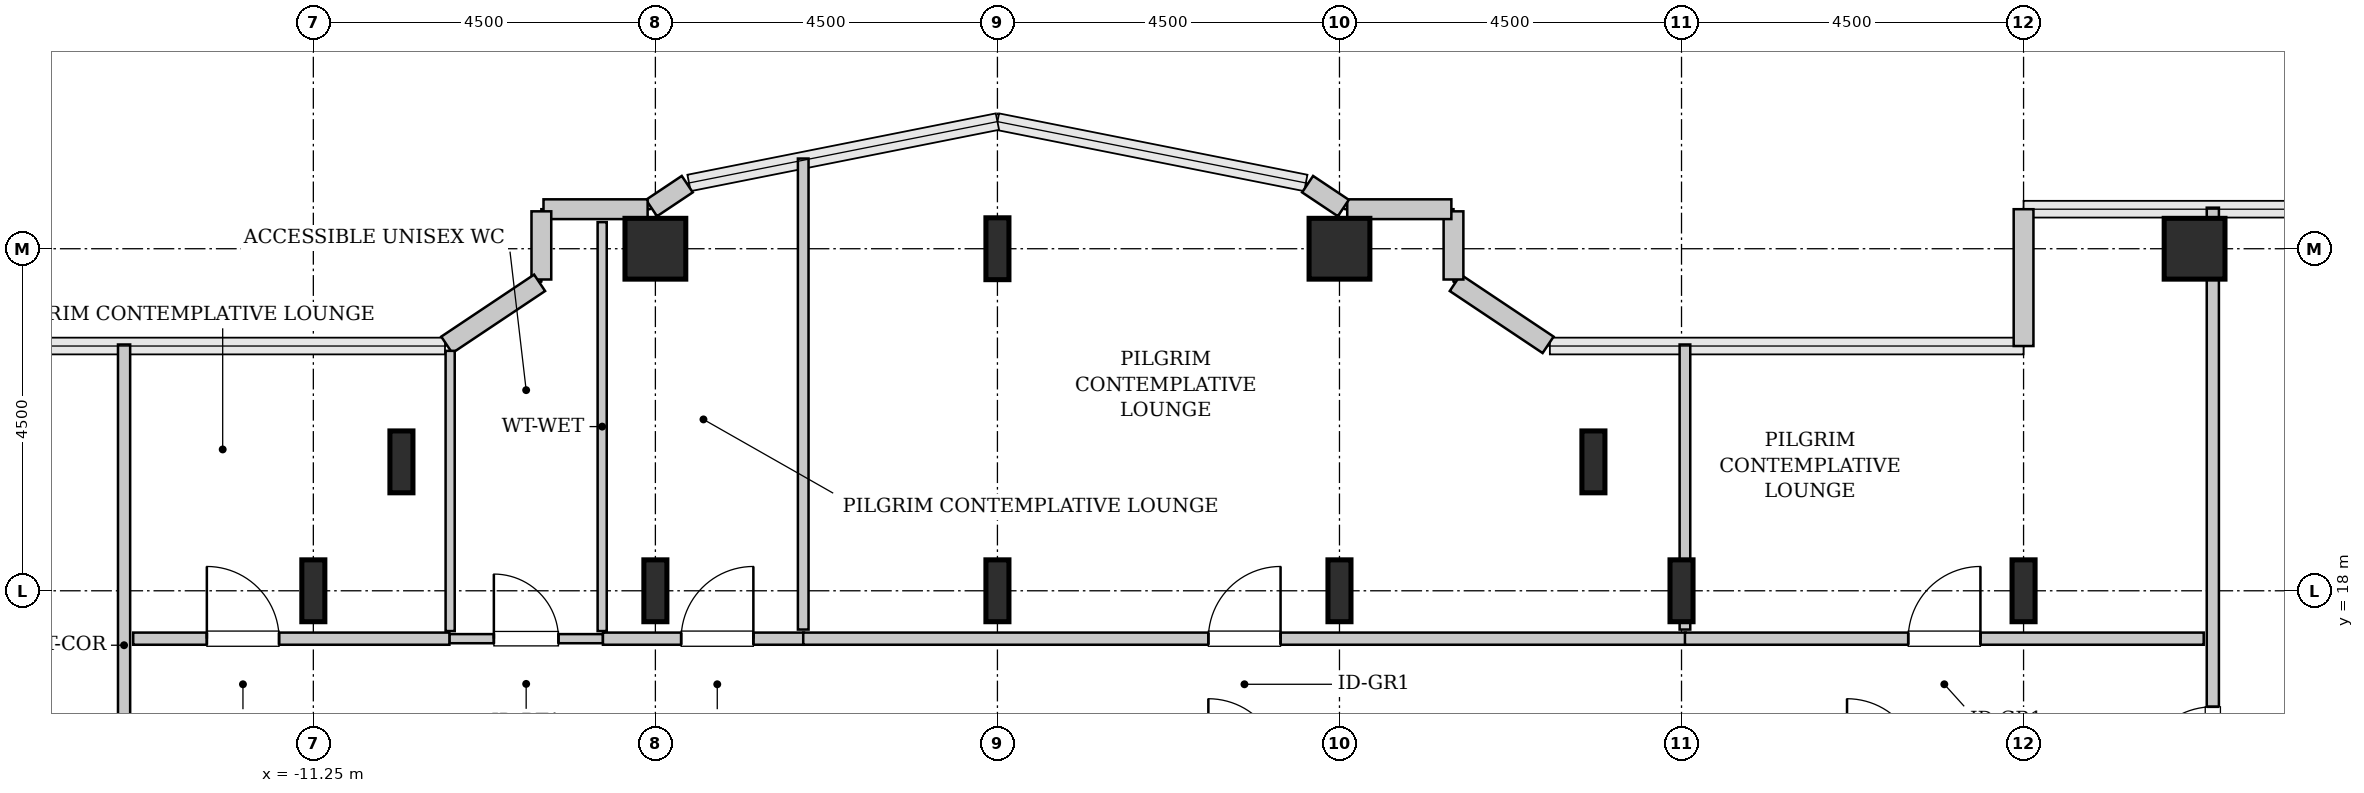
"""IFC4 building model, lengths in metres.
Left out: names, types, materials, properties, quantities, classifications, styles, units other than length and angle.
Written with IfcOpenShell. Run it as: python <this file> out.ifc"""

import sys

from ifc_helpers import new_model, si_unit, direction, frame, frame_2d, origin, origin_2d, place, context, subcontext, project, spatial, rectangle, hollow_rectangle, i_section, extrude, source, transform, mapped, element, fill, save


model = new_model("IFC4")
c1 = context("Model", 3, precision=1e-05, world=origin(), true_north=direction((0.0, 1.0)))
c2 = subcontext(c1, "Body", "Model", "MODEL_VIEW")
j1 = project(units=[si_unit("LENGTHUNIT", "METRE"), si_unit("PLANEANGLEUNIT", "RADIAN")], contexts=[c1])
p1 = place(None, origin())
s1 = spatial("IfcSite", under=j1, at=p1, CompositionType="ELEMENT")
p2 = place(p1, origin())
s2 = spatial("IfcBuilding", under=s1, at=p2, CompositionType="ELEMENT")
p3 = place(p2, frame((0.0, 0.0, 167.8)))
s3 = spatial("IfcBuildingStorey", under=s2, at=p3, CompositionType="ELEMENT", Elevation=167.8)
m1 = source(origin(), c2, "Body", "SweptSolid", [
    extrude(i_section(OverallWidth=0.303, OverallDepth=0.814, WebThickness=0.021, FlangeThickness=0.04, FilletRadius=0.03, at=origin_2d()), origin(), (0.0, 0.0, 1.0), 3.8),
])
for number, where, z_axis, x_axis in (
    (1, (-11.25, 18.0, 0.0), (0.0, 0.0, 1.0), (1.0, 0.0, 0.0)),
    (2, (-10.091, 19.696, 0.0), (0.0, 0.0, 1.0), (1.0, 0.0, 0.0)),
    (3, (-6.75, 18.0, 0.0), (0.0, 0.0, 1.0), (1.0, 0.0, 0.0)),
):
    element("IfcColumn", number, at=place(p3, frame(where, z_axis=z_axis, x_axis=x_axis)), inside=s3, PredefinedType="COLUMN", context=c2, shape_type="MappedRepresentation", body=[
        mapped(m1, transform((0.0, 0.0, 0.0), x_axis=(1.0, 0.0, 0.0), y_axis=(0.0, 1.0, 0.0), z_axis=(0.0, 0.0, 1.0), scale=1.0)),
    ])
m2 = source(origin(), c2, "Body", "SweptSolid", [
    extrude(hollow_rectangle(XDim=0.8, YDim=0.8, WallThickness=0.04, InnerFilletRadius=0.04, OuterFilletRadius=0.08, at=origin_2d()), origin(), (0.0, 0.0, 1.0), 3.8),
])
p4 = place(p3, frame((-6.75, 22.5, 0.0), z_axis=(0.0, 0.0, 1.0), x_axis=(1.0, 0.0, 0.0)))
e4 = element("IfcColumn", 4, at=p4, inside=s3, PredefinedType="COLUMN", context=c2, shape_type="MappedRepresentation", body=[
    mapped(m2, transform((0.0, 0.0, 0.0), x_axis=(1.0, 0.0, 0.0), y_axis=(0.0, 1.0, 0.0), z_axis=(0.0, 0.0, 1.0), scale=1.0)),
])
for number, where, z_axis, x_axis in (
    (5, (-2.25, 18.0, 0.0), (0.0, 0.0, 1.0), (1.0, 0.0, 0.0)),
    (6, (-2.25, 22.5, 0.0), (0.0, 0.0, 1.0), (1.0, 0.0, 0.0)),
    (7, (2.25, 18.0, 0.0), (0.0, 0.0, 1.0), (1.0, 0.0, 0.0)),
):
    element("IfcColumn", number, at=place(p3, frame(where, z_axis=z_axis, x_axis=x_axis)), inside=s3, PredefinedType="COLUMN", context=c2, shape_type="MappedRepresentation", body=[
        mapped(m1, transform((0.0, 0.0, 0.0), x_axis=(1.0, 0.0, 0.0), y_axis=(0.0, 1.0, 0.0), z_axis=(0.0, 0.0, 1.0), scale=1.0)),
    ])
p5 = place(p3, frame((2.25, 22.5, 0.0), z_axis=(0.0, 0.0, 1.0), x_axis=(1.0, 0.0, 0.0)))
e8 = element("IfcColumn", 8, at=p5, inside=s3, PredefinedType="COLUMN", context=c2, shape_type="MappedRepresentation", body=[
    mapped(m2, transform((0.0, 0.0, 0.0), x_axis=(1.0, 0.0, 0.0), y_axis=(0.0, 1.0, 0.0), z_axis=(0.0, 0.0, 1.0), scale=1.0)),
])
for number, where, z_axis, x_axis in (
    (9, (5.591, 19.696, 0.0), (0.0, 0.0, 1.0), (1.0, 0.0, 0.0)),
    (10, (6.75, 18.0, 0.0), (0.0, 0.0, 1.0), (1.0, 0.0, 0.0)),
    (11, (11.25, 18.0, 0.0), (0.0, 0.0, 1.0), (1.0, 0.0, 0.0)),
):
    element("IfcColumn", number, at=place(p3, frame(where, z_axis=z_axis, x_axis=x_axis)), inside=s3, PredefinedType="COLUMN", context=c2, shape_type="MappedRepresentation", body=[
        mapped(m1, transform((0.0, 0.0, 0.0), x_axis=(1.0, 0.0, 0.0), y_axis=(0.0, 1.0, 0.0), z_axis=(0.0, 0.0, 1.0), scale=1.0)),
    ])
p6 = place(p3, frame((13.5, 22.5, 0.0), z_axis=(0.0, 0.0, 1.0), x_axis=(1.0, 0.0, 0.0)))
e12 = element("IfcColumn", 12, at=p6, inside=s3, PredefinedType="COLUMN", context=c2, shape_type="MappedRepresentation", body=[
    mapped(m2, transform((0.0, 0.0, 0.0), x_axis=(1.0, 0.0, 0.0), y_axis=(0.0, 1.0, 0.0), z_axis=(0.0, 0.0, 1.0), scale=1.0)),
])
m3 = source(origin(), c2, "Body", "SweptSolid", [
    extrude(rectangle(XDim=1.8, YDim=0.26, at=frame_2d((0.9, 0.0))), origin(), (0.0, 0.0, 1.0), 3.55),
])
p7 = place(p3, frame((11.25, 23.02, 0.0), z_axis=(0.0, 0.0, 1.0), x_axis=(0.0, -1.0, 0.0)))
e13 = element("IfcWall", 13, at=p7, inside=s3, PredefinedType="SOLIDWALL", context=c2, shape_type="MappedRepresentation", body=[
    mapped(m3, transform((0.0, 0.0, 0.0), x_axis=(1.0, 0.0, 0.0), y_axis=(0.0, 1.0, 0.0), z_axis=(0.0, 0.0, 1.0), scale=1.0)),
])
m4 = source(origin(), c2, "Body", "SweptSolid", [
    extrude(rectangle(XDim=1.469, YDim=0.26, at=frame_2d((0.734, 0.0))), origin(), (0.0, 0.0, 1.0), 3.55),
])
p8 = place(p3, frame((4.995, 21.236, 0.0), z_axis=(0.0, 0.0, 1.0), x_axis=(-0.831461760506, 0.555581983884, 0.0)))
e14 = element("IfcWall", 14, at=p8, inside=s3, PredefinedType="SOLIDWALL", context=c2, shape_type="MappedRepresentation", body=[
    mapped(m4, transform((0.0, 0.0, 0.0), x_axis=(1.0, 0.0, 0.0), y_axis=(0.0, 1.0, 0.0), z_axis=(0.0, 0.0, 1.0), scale=1.0)),
])
m5 = source(origin(), c2, "Body", "SweptSolid", [
    extrude(rectangle(XDim=0.897, YDim=0.26, at=frame_2d((0.448, 0.0))), origin(), (0.0, 0.0, 1.0), 3.55),
])
p9 = place(p3, frame((3.75, 22.095, 0.0), z_axis=(0.0, 0.0, 1.0), x_axis=(0.0, 1.0, 0.0)))
e15 = element("IfcWall", 15, at=p9, inside=s3, PredefinedType="SOLIDWALL", context=c2, shape_type="MappedRepresentation", body=[
    mapped(m5, transform((0.0, 0.0, 0.0), x_axis=(1.0, 0.0, 0.0), y_axis=(0.0, 1.0, 0.0), z_axis=(0.0, 0.0, 1.0), scale=1.0)),
])
m6 = source(origin(), c2, "Body", "SweptSolid", [
    extrude(rectangle(XDim=1.37, YDim=0.26, at=frame_2d((0.685, 0.0))), origin(), (0.0, 0.0, 1.0), 3.55),
])
p10 = place(p3, frame((3.722, 23.02, 0.0), z_axis=(0.0, 0.0, 1.0), x_axis=(-1.0, 0.0, 0.0)))
e16 = element("IfcWall", 16, at=p10, inside=s3, PredefinedType="SOLIDWALL", context=c2, shape_type="MappedRepresentation", body=[
    mapped(m6, transform((0.0, 0.0, 0.0), x_axis=(1.0, 0.0, 0.0), y_axis=(0.0, 1.0, 0.0), z_axis=(0.0, 0.0, 1.0), scale=1.0)),
])
m7 = source(origin(), c2, "Body", "SweptSolid", [
    extrude(rectangle(XDim=0.565, YDim=0.26, at=frame_2d((0.283, 0.0))), origin(), (0.0, 0.0, 1.0), 3.55),
])
for number, where, z_axis, x_axis in (
    (17, (2.301, 23.036, 0.0), (0.0, 0.0, 1.0), (-0.832, 0.555, 0.0)),
    (18, (-6.331, 23.35, 0.0), (0.0, 0.0, 1.0), (-0.832, -0.555, 0.0)),
):
    element("IfcWall", number, at=place(p3, frame(where, z_axis=z_axis, x_axis=x_axis)), inside=s3, PredefinedType="SOLIDWALL", context=c2, shape_type="MappedRepresentation", body=[
        mapped(m7, transform((0.0, 0.0, 0.0), x_axis=(1.0, 0.0, 0.0), y_axis=(0.0, 1.0, 0.0), z_axis=(0.0, 0.0, 1.0), scale=1.0)),
    ])
p11 = place(p3, frame((-6.852, 23.02, 0.0), z_axis=(0.0, 0.0, 1.0), x_axis=(-1.0, 0.0, 0.0)))
e19 = element("IfcWall", 19, at=p11, inside=s3, PredefinedType="SOLIDWALL", context=c2, shape_type="MappedRepresentation", body=[
    mapped(m6, transform((0.0, 0.0, 0.0), x_axis=(1.0, 0.0, 0.0), y_axis=(0.0, 1.0, 0.0), z_axis=(0.0, 0.0, 1.0), scale=1.0)),
])
p12 = place(p3, frame((-8.25, 22.992, 0.0), z_axis=(0.0, 0.0, 1.0), x_axis=(0.0, -1.0, 0.0)))
e20 = element("IfcWall", 20, at=p12, inside=s3, PredefinedType="SOLIDWALL", context=c2, shape_type="MappedRepresentation", body=[
    mapped(m5, transform((0.0, 0.0, 0.0), x_axis=(1.0, 0.0, 0.0), y_axis=(0.0, 1.0, 0.0), z_axis=(0.0, 0.0, 1.0), scale=1.0)),
])
p13 = place(p3, frame((-8.273, 22.052, 0.0), z_axis=(0.0, 0.0, 1.0), x_axis=(-0.831461760506, -0.555581983884, 0.0)))
e21 = element("IfcWall", 21, at=p13, inside=s3, PredefinedType="SOLIDWALL", context=c2, shape_type="MappedRepresentation", body=[
    mapped(m4, transform((0.0, 0.0, 0.0), x_axis=(1.0, 0.0, 0.0), y_axis=(0.0, 1.0, 0.0), z_axis=(0.0, 0.0, 1.0), scale=1.0)),
])
m8 = source(origin(), c2, "Body", "SweptSolid", [
    extrude(rectangle(XDim=2.02, YDim=0.12, at=frame_2d((1.01, 0.0))), origin(), (0.0, 0.0, 1.0), 3.535),
])
p14 = place(p3, frame((-9.46, 17.37, 0.0), z_axis=(0.0, 0.0, 1.0), x_axis=(1.0, 0.0, 0.0)))
e22 = element("IfcWall", 22, at=p14, inside=s3, PredefinedType="PLUMBINGWALL", context=c2, shape_type="MappedRepresentation", body=[
    mapped(m8, transform((0.0, 0.0, 0.0), x_axis=(1.0, 0.0, 0.0), y_axis=(0.0, 1.0, 0.0), z_axis=(0.0, 0.0, 1.0), scale=1.0)),
])
p15 = place(p14, frame((0.585, 0.0, 0.0)))
e23 = element("IfcOpeningElement", 23, at=p15, cuts=e22, PredefinedType="OPENING", context=c2, shape_type="SweptSolid", body=[
    extrude(rectangle(XDim=0.85, YDim=2.1, at=frame_2d((0.425, 1.05))), frame((0.0, 0.07, 0.0), z_axis=(0.0, -1.0, 0.0), x_axis=(1.0, 0.0, 0.0)), (0.0, 0.0, 1.0), 0.14),
])
m9 = source(origin(), c2, "Body", "SweptSolid", [
    extrude(rectangle(XDim=5.38, YDim=0.12, at=frame_2d((2.69, 0.0))), origin(), (0.0, 0.0, 1.0), 3.535),
])
p16 = place(p3, frame((-7.45, 17.47, 0.0), z_axis=(0.0, 0.0, 1.0), x_axis=(0.0, 1.0, 0.0)))
e24 = element("IfcWall", 24, at=p16, inside=s3, PredefinedType="PLUMBINGWALL", context=c2, shape_type="MappedRepresentation", body=[
    mapped(m9, transform((0.0, 0.0, 0.0), x_axis=(1.0, 0.0, 0.0), y_axis=(0.0, 1.0, 0.0), z_axis=(0.0, 0.0, 1.0), scale=1.0)),
])
m10 = source(origin(), c2, "Body", "SweptSolid", [
    extrude(rectangle(XDim=3.687, YDim=0.12, at=frame_2d((1.843, 0.0))), origin(), (0.0, 0.0, 1.0), 3.535),
])
p17 = place(p3, frame((-9.45, 17.47, 0.0), z_axis=(0.0, 0.0, 1.0), x_axis=(0.0, 1.0, 0.0)))
e25 = element("IfcWall", 25, at=p17, inside=s3, PredefinedType="PLUMBINGWALL", context=c2, shape_type="MappedRepresentation", body=[
    mapped(m10, transform((0.0, 0.0, 0.0), x_axis=(1.0, 0.0, 0.0), y_axis=(0.0, 1.0, 0.0), z_axis=(0.0, 0.0, 1.0), scale=1.0)),
])
m11 = source(origin(), c2, "Body", "SweptSolid", [
    extrude(rectangle(XDim=12.845, YDim=0.16, at=frame_2d((6.422, 0.0))), origin(), (0.0, 0.0, 1.0), 3.535),
])
p18 = place(p3, frame((-13.74, 8.395, 0.0), z_axis=(0.0, 0.0, 1.0), x_axis=(0.0, 1.0, 0.0)))
e26 = element("IfcWall", 26, at=p18, inside=s3, PredefinedType="PARTITIONING", context=c2, shape_type="MappedRepresentation", body=[
    mapped(m11, transform((0.0, 0.0, 0.0), x_axis=(1.0, 0.0, 0.0), y_axis=(0.0, 1.0, 0.0), z_axis=(0.0, 0.0, 1.0), scale=1.0)),
])
p19 = place(p18, frame((4.032, 0.0, 0.0)))
e27 = element("IfcOpeningElement", 27, at=p19, cuts=e26, PredefinedType="OPENING", context=c2, shape_type="SweptSolid", body=[
    extrude(rectangle(XDim=0.95, YDim=2.1, at=frame_2d((0.475, 1.05))), frame((0.0, 0.09, 0.0), z_axis=(0.0, -1.0, 0.0), x_axis=(1.0, 0.0, 0.0)), (0.0, 0.0, 1.0), 0.18),
])
m12 = source(origin(), c2, "Body", "SweptSolid", [
    extrude(rectangle(XDim=8.453, YDim=0.16, at=frame_2d((4.226, 0.0))), origin(), (0.0, 0.0, 1.0), 3.535),
])
p20 = place(p3, frame((13.74, 14.587, 0.0), z_axis=(0.0, 0.0, 1.0), x_axis=(0.0, 1.0, 0.0)))
e28 = element("IfcWall", 28, at=p20, inside=s3, PredefinedType="PARTITIONING", context=c2, shape_type="MappedRepresentation", body=[
    mapped(m12, transform((0.0, 0.0, 0.0), x_axis=(1.0, 0.0, 0.0), y_axis=(0.0, 1.0, 0.0), z_axis=(0.0, 0.0, 1.0), scale=1.0)),
])
p21 = place(p20, frame((0.936, 0.0, 0.0)))
e29 = element("IfcOpeningElement", 29, at=p21, cuts=e28, PredefinedType="OPENING", context=c2, shape_type="SweptSolid", body=[
    extrude(rectangle(XDim=0.95, YDim=2.1, at=frame_2d((0.475, 1.05))), frame((0.0, 0.09, 0.0), z_axis=(0.0, -1.0, 0.0), x_axis=(1.0, 0.0, 0.0)), (0.0, 0.0, 1.0), 0.18),
])
m13 = source(origin(), c2, "Body", "SweptSolid", [
    extrude(rectangle(XDim=2.645, YDim=0.16, at=frame_2d((1.323, 0.0))), origin(), (0.0, 0.0, 1.0), 3.535),
])
p22 = place(p3, frame((-7.44, 17.37, 0.0), z_axis=(0.0, 0.0, 1.0), x_axis=(1.0, 0.0, 0.0)))
e30 = element("IfcWall", 30, at=p22, inside=s3, PredefinedType="PARTITIONING", context=c2, shape_type="MappedRepresentation", body=[
    mapped(m13, transform((0.0, 0.0, 0.0), x_axis=(1.0, 0.0, 0.0), y_axis=(0.0, 1.0, 0.0), z_axis=(0.0, 0.0, 1.0), scale=1.0)),
])
p23 = place(p22, frame((1.029, 0.0, 0.0)))
e31 = element("IfcOpeningElement", 31, at=p23, cuts=e30, PredefinedType="OPENING", context=c2, shape_type="SweptSolid", body=[
    extrude(rectangle(XDim=0.95, YDim=2.1, at=frame_2d((0.475, 1.05))), frame((0.0, 0.09, 0.0), z_axis=(0.0, -1.0, 0.0), x_axis=(1.0, 0.0, 0.0)), (0.0, 0.0, 1.0), 0.18),
])
m14 = source(origin(), c2, "Body", "SweptSolid", [
    extrude(rectangle(XDim=6.197, YDim=0.14, at=frame_2d((3.098, 0.0))), origin(), (0.0, 0.0, 1.0), 3.535),
])
p24 = place(p3, frame((-4.805, 17.49, 0.0), z_axis=(0.0, 0.0, 1.0), x_axis=(0.0, 1.0, 0.0)))
e32 = element("IfcWall", 32, at=p24, inside=s3, PredefinedType="PARTITIONING", context=c2, shape_type="MappedRepresentation", body=[
    mapped(m14, transform((0.0, 0.0, 0.0), x_axis=(1.0, 0.0, 0.0), y_axis=(0.0, 1.0, 0.0), z_axis=(0.0, 0.0, 1.0), scale=1.0)),
])
m15 = source(origin(), c2, "Body", "SweptSolid", [
    extrude(rectangle(XDim=4.16, YDim=0.16, at=frame_2d((2.08, 0.0))), origin(), (0.0, 0.0, 1.0), 3.535),
])
p25 = place(p3, frame((-13.62, 17.37, 0.0), z_axis=(0.0, 0.0, 1.0), x_axis=(1.0, 0.0, 0.0)))
e33 = element("IfcWall", 33, at=p25, inside=s3, PredefinedType="PARTITIONING", context=c2, shape_type="MappedRepresentation", body=[
    mapped(m15, transform((0.0, 0.0, 0.0), x_axis=(1.0, 0.0, 0.0), y_axis=(0.0, 1.0, 0.0), z_axis=(0.0, 0.0, 1.0), scale=1.0)),
])
p26 = place(p25, frame((0.969, 0.0, 0.0)))
e34 = element("IfcOpeningElement", 34, at=p26, cuts=e33, PredefinedType="OPENING", context=c2, shape_type="SweptSolid", body=[
    extrude(rectangle(XDim=0.95, YDim=2.1, at=frame_2d((0.475, 1.05))), frame((0.0, 0.09, 0.0), z_axis=(0.0, -1.0, 0.0), x_axis=(1.0, 0.0, 0.0)), (0.0, 0.0, 1.0), 0.18),
])
m16 = source(origin(), c2, "Body", "SweptSolid", [
    extrude(rectangle(XDim=11.61, YDim=0.16, at=frame_2d((5.805, 0.0))), origin(), (0.0, 0.0, 1.0), 3.535),
])
p27 = place(p3, frame((-4.805, 17.37, 0.0), z_axis=(0.0, 0.0, 1.0), x_axis=(1.0, 0.0, 0.0)))
e35 = element("IfcWall", 35, at=p27, inside=s3, PredefinedType="PARTITIONING", context=c2, shape_type="MappedRepresentation", body=[
    mapped(m16, transform((0.0, 0.0, 0.0), x_axis=(1.0, 0.0, 0.0), y_axis=(0.0, 1.0, 0.0), z_axis=(0.0, 0.0, 1.0), scale=1.0)),
])
p28 = place(p27, frame((5.33, 0.0, 0.0)))
e36 = element("IfcOpeningElement", 36, at=p28, cuts=e35, PredefinedType="OPENING", context=c2, shape_type="SweptSolid", body=[
    extrude(rectangle(XDim=0.95, YDim=2.1, at=frame_2d((0.475, 1.05))), frame((0.0, 0.09, 0.0), z_axis=(0.0, -1.0, 0.0), x_axis=(1.0, 0.0, 0.0)), (0.0, 0.0, 1.0), 0.18),
])
m17 = source(origin(), c2, "Body", "SweptSolid", [
    extrude(rectangle(XDim=3.75, YDim=0.14, at=frame_2d((1.875, 0.0))), origin(), (0.0, 0.0, 1.0), 3.535),
])
p29 = place(p3, frame((6.795, 17.49, 0.0), z_axis=(0.0, 0.0, 1.0), x_axis=(0.0, 1.0, 0.0)))
e37 = element("IfcWall", 37, at=p29, inside=s3, PredefinedType="PARTITIONING", context=c2, shape_type="MappedRepresentation", body=[
    mapped(m17, transform((0.0, 0.0, 0.0), x_axis=(1.0, 0.0, 0.0), y_axis=(0.0, 1.0, 0.0), z_axis=(0.0, 0.0, 1.0), scale=1.0)),
])
m18 = source(origin(), c2, "Body", "SweptSolid", [
    extrude(rectangle(XDim=6.825, YDim=0.16, at=frame_2d((3.413, 0.0))), origin(), (0.0, 0.0, 1.0), 3.535),
])
p30 = place(p3, frame((6.795, 17.37, 0.0), z_axis=(0.0, 0.0, 1.0), x_axis=(1.0, 0.0, 0.0)))
e38 = element("IfcWall", 38, at=p30, inside=s3, PredefinedType="PARTITIONING", context=c2, shape_type="MappedRepresentation", body=[
    mapped(m18, transform((0.0, 0.0, 0.0), x_axis=(1.0, 0.0, 0.0), y_axis=(0.0, 1.0, 0.0), z_axis=(0.0, 0.0, 1.0), scale=1.0)),
])
p31 = place(p30, frame((2.938, 0.0, 0.0)))
e39 = element("IfcOpeningElement", 39, at=p31, cuts=e38, PredefinedType="OPENING", context=c2, shape_type="SweptSolid", body=[
    extrude(rectangle(XDim=0.95, YDim=2.1, at=frame_2d((0.475, 1.05))), frame((0.0, 0.09, 0.0), z_axis=(0.0, -1.0, 0.0), x_axis=(1.0, 0.0, 0.0)), (0.0, 0.0, 1.0), 0.18),
])
m19 = source(origin(), c2, "Body", "SweptSolid", [
    extrude(rectangle(XDim=0.85, YDim=2.1, at=frame_2d((0.425, 1.05))), frame((0.0, 0.025, 0.0), z_axis=(0.0, -1.0, 0.0), x_axis=(1.0, 0.0, 0.0)), (0.0, 0.0, 1.0), 0.05),
])
p32 = place(p15, origin())
e40 = element("IfcDoor", 40, at=p32, inside=s3, OperationType="SINGLE_SWING_LEFT", PredefinedType="DOOR", context=c2, shape_type="MappedRepresentation", body=[
    mapped(m19, transform((0.0, 0.0, 0.0), x_axis=(1.0, 0.0, 0.0), y_axis=(0.0, 1.0, 0.0), z_axis=(0.0, 0.0, 1.0), scale=1.0)),
])
fill(e23, e40)
m20 = source(origin(), c2, "Body", "SweptSolid", [
    extrude(rectangle(XDim=0.95, YDim=2.1, at=frame_2d((0.475, 1.05))), frame((0.0, 0.025, 0.0), z_axis=(0.0, -1.0, 0.0), x_axis=(1.0, 0.0, 0.0)), (0.0, 0.0, 1.0), 0.05),
])
p33 = place(p21, origin())
e41 = element("IfcDoor", 41, at=p33, inside=s3, OperationType="SINGLE_SWING_LEFT", PredefinedType="DOOR", context=c2, shape_type="MappedRepresentation", body=[
    mapped(m20, transform((0.0, 0.0, 0.0), x_axis=(1.0, 0.0, 0.0), y_axis=(0.0, 1.0, 0.0), z_axis=(0.0, 0.0, 1.0), scale=1.0)),
])
fill(e29, e41)
p34 = place(p23, origin())
e42 = element("IfcDoor", 42, at=p34, inside=s3, OperationType="SINGLE_SWING_RIGHT", PredefinedType="DOOR", context=c2, shape_type="MappedRepresentation", body=[
    mapped(m20, transform((0.0, 0.0, 0.0), x_axis=(1.0, 0.0, 0.0), y_axis=(0.0, 1.0, 0.0), z_axis=(0.0, 0.0, 1.0), scale=1.0)),
])
fill(e31, e42)
p35 = place(p26, origin())
e43 = element("IfcDoor", 43, at=p35, inside=s3, OperationType="SINGLE_SWING_LEFT", PredefinedType="DOOR", context=c2, shape_type="MappedRepresentation", body=[
    mapped(m20, transform((0.0, 0.0, 0.0), x_axis=(1.0, 0.0, 0.0), y_axis=(0.0, 1.0, 0.0), z_axis=(0.0, 0.0, 1.0), scale=1.0)),
])
fill(e34, e43)
p36 = place(p28, origin())
e44 = element("IfcDoor", 44, at=p36, inside=s3, OperationType="SINGLE_SWING_RIGHT", PredefinedType="DOOR", context=c2, shape_type="MappedRepresentation", body=[
    mapped(m20, transform((0.0, 0.0, 0.0), x_axis=(1.0, 0.0, 0.0), y_axis=(0.0, 1.0, 0.0), z_axis=(0.0, 0.0, 1.0), scale=1.0)),
])
fill(e36, e44)
p37 = place(p31, origin())
e45 = element("IfcDoor", 45, at=p37, inside=s3, OperationType="SINGLE_SWING_RIGHT", PredefinedType="DOOR", context=c2, shape_type="MappedRepresentation", body=[
    mapped(m20, transform((0.0, 0.0, 0.0), x_axis=(1.0, 0.0, 0.0), y_axis=(0.0, 1.0, 0.0), z_axis=(0.0, 0.0, 1.0), scale=1.0)),
])
fill(e39, e45)
save(model, sys.argv[1])
